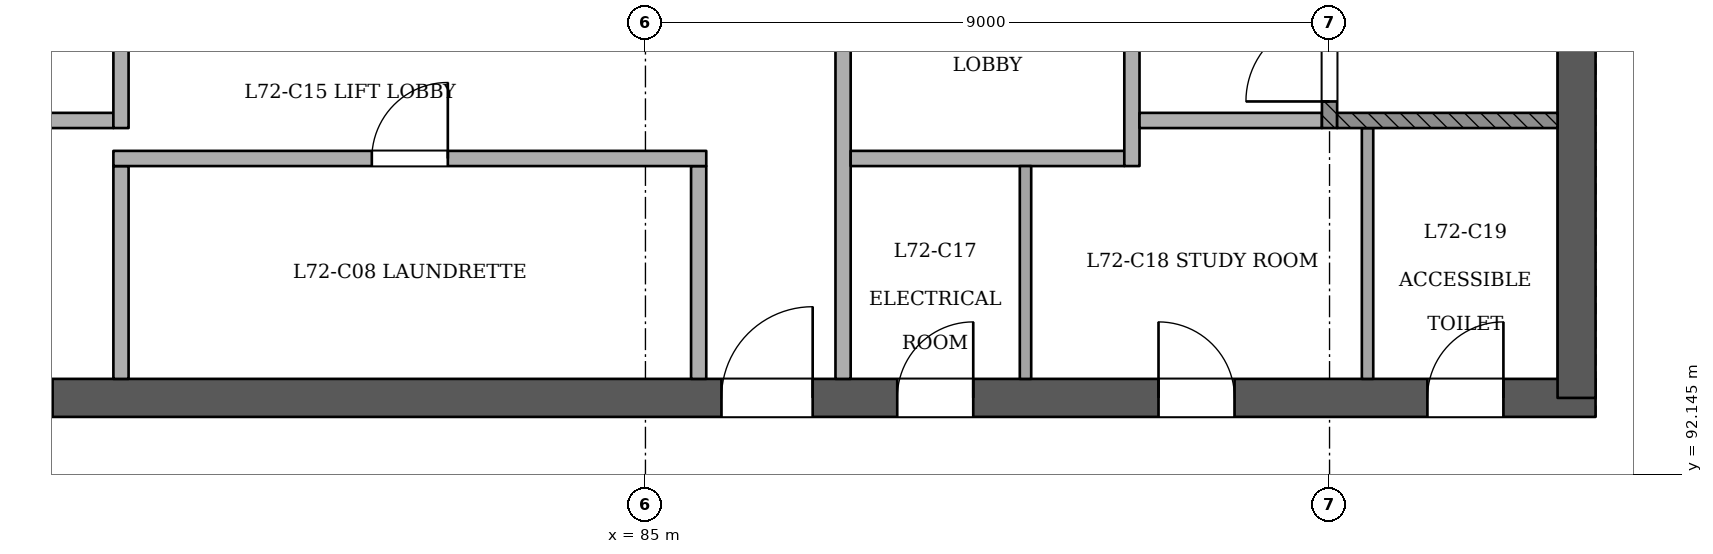
"""IFC4 building model, lengths in metres.
Left out: names, types, materials, properties, quantities, classifications, styles, units other than length and angle.
Written with IfcOpenShell. Run it as: python <this file> out.ifc"""

import sys

from ifc_helpers import new_model, si_unit, direction, frame, frame_2d, origin, place, context, subcontext, project, spatial, rectangle, extrude, element, fill, save


model = new_model("IFC4")
c1 = context("Model", 3, precision=1e-05, world=origin(), true_north=direction((0.0, 1.0)))
c2 = subcontext(c1, "Body", "Model", "MODEL_VIEW")
j1 = project(units=[si_unit("LENGTHUNIT", "METRE"), si_unit("PLANEANGLEUNIT", "RADIAN")], contexts=[c1])
p1 = place(None, origin())
s1 = spatial("IfcSite", under=j1, at=p1, CompositionType="ELEMENT")
p2 = place(p1, origin())
s2 = spatial("IfcBuilding", under=s1, at=p2, CompositionType="ELEMENT")
p3 = place(p2, frame((0.0, 0.0, 278.8)))
s3 = spatial("IfcBuildingStorey", under=s2, at=p3, CompositionType="ELEMENT", Elevation=278.8)
p4 = place(p3, frame((72.75, 93.15, 0.0), z_axis=(0.0, 0.0, 1.0), x_axis=(1.0, 0.0, 0.0)))
e1 = element("IfcWall", 1, at=p4, inside=s3, PredefinedType="SHEAR", context=c2, shape_type="SweptSolid", body=[
    extrude(rectangle(XDim=24.75, YDim=0.5, at=frame_2d((12.375, 0.0))), origin(), (0.0, 0.0, 1.0), 3.6),
])
p5 = place(p4, frame((1.05, 0.0, 0.0)))
e2 = element("IfcOpeningElement", 2, at=p5, cuts=e1, PredefinedType="OPENING", context=c2, shape_type="SweptSolid", body=[
    extrude(rectangle(XDim=1.2, YDim=2.1, at=frame_2d((0.6, 1.05))), frame((0.0, 0.26, 0.0), z_axis=(0.0, -1.0, 0.0), x_axis=(1.0, 0.0, 0.0)), (0.0, 0.0, 1.0), 0.521),
])
p6 = place(p4, frame((3.25, 0.0, 0.0)))
e3 = element("IfcOpeningElement", 3, at=p6, cuts=e1, PredefinedType="OPENING", context=c2, shape_type="SweptSolid", body=[
    extrude(rectangle(XDim=1.2, YDim=2.1, at=frame_2d((0.6, 1.05))), frame((0.0, 0.26, 0.0), z_axis=(0.0, -1.0, 0.0), x_axis=(1.0, 0.0, 0.0)), (0.0, 0.0, 1.0), 0.521),
])
p7 = place(p4, frame((13.25, 0.0, 0.0)))
e4 = element("IfcOpeningElement", 4, at=p7, cuts=e1, PredefinedType="OPENING", context=c2, shape_type="SweptSolid", body=[
    extrude(rectangle(XDim=1.2, YDim=2.1, at=frame_2d((0.6, 1.05))), frame((0.0, 0.26, 0.0), z_axis=(0.0, -1.0, 0.0), x_axis=(1.0, 0.0, 0.0)), (0.0, 0.0, 1.0), 0.521),
])
p8 = place(p4, frame((15.562, 0.0, 0.0)))
e5 = element("IfcOpeningElement", 5, at=p8, cuts=e1, PredefinedType="OPENING", context=c2, shape_type="SweptSolid", body=[
    extrude(rectangle(XDim=1.0, YDim=2.1, at=frame_2d((0.5, 1.05))), frame((0.0, 0.26, 0.0), z_axis=(0.0, -1.0, 0.0), x_axis=(1.0, 0.0, 0.0)), (0.0, 0.0, 1.0), 0.521),
])
p9 = place(p4, frame((19.0, 0.0, 0.0)))
e6 = element("IfcOpeningElement", 6, at=p9, cuts=e1, PredefinedType="OPENING", context=c2, shape_type="SweptSolid", body=[
    extrude(rectangle(XDim=1.0, YDim=2.1, at=frame_2d((0.5, 1.05))), frame((0.0, 0.26, 0.0), z_axis=(0.0, -1.0, 0.0), x_axis=(1.0, 0.0, 0.0)), (0.0, 0.0, 1.0), 0.521),
])
p10 = place(p4, frame((22.538, 0.0, 0.0)))
e7 = element("IfcOpeningElement", 7, at=p10, cuts=e1, PredefinedType="OPENING", context=c2, shape_type="SweptSolid", body=[
    extrude(rectangle(XDim=1.0, YDim=2.1, at=frame_2d((0.5, 1.05))), frame((0.0, 0.26, 0.0), z_axis=(0.0, -1.0, 0.0), x_axis=(1.0, 0.0, 0.0)), (0.0, 0.0, 1.0), 0.521),
])
p11 = place(p3, frame((97.25, 93.15, 0.0), z_axis=(0.0, 0.0, 1.0), x_axis=(0.0, 1.0, 0.0)))
e8 = element("IfcWall", 8, at=p11, inside=s3, PredefinedType="SHEAR", context=c2, shape_type="SweptSolid", body=[
    extrude(rectangle(XDim=10.75, YDim=0.5, at=frame_2d((5.375, 0.0))), origin(), (0.0, 0.0, 1.0), 3.6),
])
for number, where, z_axis, x_axis in (
    (9, (78.1, 93.4, 0.0), (0.0, 0.0, 1.0), (0.0, 1.0, 0.0)),
    (10, (85.7, 93.4, 0.0), (0.0, 0.0, 1.0), (0.0, 1.0, 0.0)),
):
    element("IfcWall", number, at=place(p3, frame(where, z_axis=z_axis, x_axis=x_axis)), inside=s3, PredefinedType="PARTITIONING", context=c2, shape_type="SweptSolid", body=[
        extrude(rectangle(XDim=2.8, YDim=0.2, at=frame_2d((1.4, 0.0))), origin(), (0.0, 0.0, 1.0), 3.2),
    ])
p12 = place(p3, frame((87.6, 93.4, 0.0), z_axis=(0.0, 0.0, 1.0), x_axis=(0.0, 1.0, 0.0)))
e11 = element("IfcWall", 11, at=p12, inside=s3, PredefinedType="PARTITIONING", context=c2, shape_type="SweptSolid", body=[
    extrude(rectangle(XDim=7.0, YDim=0.2, at=frame_2d((3.5, 0.0))), origin(), (0.0, 0.0, 1.0), 3.2),
])
p13 = place(p12, frame((4.45, 0.0, 0.0)))
e12 = element("IfcOpeningElement", 12, at=p13, cuts=e11, PredefinedType="OPENING", context=c2, shape_type="SweptSolid", body=[
    extrude(rectangle(XDim=1.1, YDim=2.1, at=frame_2d((0.55, 1.05))), frame((0.0, 0.11, 0.0), z_axis=(0.0, -1.0, 0.0), x_axis=(1.0, 0.0, 0.0)), (0.0, 0.0, 1.0), 0.221),
])
p14 = place(p3, frame((90.0, 93.4, 0.0), z_axis=(0.0, 0.0, 1.0), x_axis=(0.0, 1.0, 0.0)))
e13 = element("IfcWall", 13, at=p14, inside=s3, PredefinedType="PARTITIONING", context=c2, shape_type="SweptSolid", body=[
    extrude(rectangle(XDim=2.8, YDim=0.15, at=frame_2d((1.4, 0.0))), origin(), (0.0, 0.0, 1.0), 3.2),
])
p15 = place(p3, frame((94.5, 93.4, 0.0), z_axis=(0.0, 0.0, 1.0), x_axis=(0.0, 1.0, 0.0)))
e14 = element("IfcWall", 14, at=p15, inside=s3, PredefinedType="PARTITIONING", context=c2, shape_type="SweptSolid", body=[
    extrude(rectangle(XDim=3.3, YDim=0.15, at=frame_2d((1.65, 0.0))), origin(), (0.0, 0.0, 1.0), 3.2),
])
p16 = place(p3, frame((78.0, 96.3, 0.0), z_axis=(0.0, 0.0, 1.0), x_axis=(1.0, 0.0, 0.0)))
e15 = element("IfcWall", 15, at=p16, inside=s3, PredefinedType="PARTITIONING", context=c2, shape_type="SweptSolid", body=[
    extrude(rectangle(XDim=7.8, YDim=0.2, at=frame_2d((3.9, 0.0))), origin(), (0.0, 0.0, 1.0), 3.2),
])
p17 = place(p16, frame((3.4, 0.0, 0.0)))
e16 = element("IfcOpeningElement", 16, at=p17, cuts=e15, PredefinedType="OPENING", context=c2, shape_type="SweptSolid", body=[
    extrude(rectangle(XDim=1.0, YDim=2.1, at=frame_2d((0.5, 1.05))), frame((0.0, 0.11, 0.0), z_axis=(0.0, -1.0, 0.0), x_axis=(1.0, 0.0, 0.0)), (0.0, 0.0, 1.0), 0.221),
])
p18 = place(p3, frame((87.7, 96.3, 0.0), z_axis=(0.0, 0.0, 1.0), x_axis=(1.0, 0.0, 0.0)))
e17 = element("IfcWall", 17, at=p18, inside=s3, PredefinedType="PARTITIONING", context=c2, shape_type="SweptSolid", body=[
    extrude(rectangle(XDim=3.6, YDim=0.2, at=frame_2d((1.8, 0.0))), origin(), (0.0, 0.0, 1.0), 3.2),
])
p19 = place(p3, frame((91.4, 96.2, 0.0), z_axis=(0.0, 0.0, 1.0), x_axis=(0.0, 1.0, 0.0)))
e18 = element("IfcWall", 18, at=p19, inside=s3, PredefinedType="PARTITIONING", context=c2, shape_type="SweptSolid", body=[
    extrude(rectangle(XDim=4.2, YDim=0.2, at=frame_2d((2.1, 0.0))), origin(), (0.0, 0.0, 1.0), 3.2),
])
p20 = place(p19, frame((2.45, 0.0, 0.0)))
e19 = element("IfcOpeningElement", 19, at=p20, cuts=e18, PredefinedType="OPENING", context=c2, shape_type="SweptSolid", body=[
    extrude(rectangle(XDim=1.1, YDim=2.1, at=frame_2d((0.55, 1.05))), frame((0.0, 0.11, 0.0), z_axis=(0.0, -1.0, 0.0), x_axis=(1.0, 0.0, 0.0)), (0.0, 0.0, 1.0), 0.221),
])
p21 = place(p3, frame((76.1, 96.8, 0.0), z_axis=(0.0, 0.0, 1.0), x_axis=(1.0, 0.0, 0.0)))
e20 = element("IfcWall", 20, at=p21, inside=s3, PredefinedType="PARTITIONING", context=c2, shape_type="SweptSolid", body=[
    extrude(rectangle(XDim=1.9, YDim=0.2, at=frame_2d((0.95, 0.0))), origin(), (0.0, 0.0, 1.0), 3.2),
])
p22 = place(p3, frame((78.1, 96.7, 0.0), z_axis=(0.0, 0.0, 1.0), x_axis=(0.0, 1.0, 0.0)))
e21 = element("IfcWall", 21, at=p22, inside=s3, PredefinedType="PARTITIONING", context=c2, shape_type="SweptSolid", body=[
    extrude(rectangle(XDim=3.7, YDim=0.2, at=frame_2d((1.85, 0.0))), origin(), (0.0, 0.0, 1.0), 3.2),
])
p23 = place(p22, frame((1.95, 0.0, 0.0)))
e22 = element("IfcOpeningElement", 22, at=p23, cuts=e21, PredefinedType="OPENING", context=c2, shape_type="SweptSolid", body=[
    extrude(rectangle(XDim=1.1, YDim=2.1, at=frame_2d((0.55, 1.05))), frame((0.0, 0.11, 0.0), z_axis=(0.0, -1.0, 0.0), x_axis=(1.0, 0.0, 0.0)), (0.0, 0.0, 1.0), 0.221),
])
p24 = place(p3, frame((91.5, 96.8, 0.0), z_axis=(0.0, 0.0, 1.0), x_axis=(1.0, 0.0, 0.0)))
e23 = element("IfcWall", 23, at=p24, inside=s3, PredefinedType="PARTITIONING", context=c2, shape_type="SweptSolid", body=[
    extrude(rectangle(XDim=2.4, YDim=0.2, at=frame_2d((1.2, 0.0))), origin(), (0.0, 0.0, 1.0), 3.2),
])
p25 = place(p3, frame((94.0, 96.7, 0.0), z_axis=(0.0, 0.0, 1.0), x_axis=(0.0, 1.0, 0.0)))
e24 = element("IfcWall", 24, at=p25, inside=s3, PredefinedType="SOLIDWALL", context=c2, shape_type="SweptSolid", body=[
    extrude(rectangle(XDim=3.7, YDim=0.2, at=frame_2d((1.85, 0.0))), origin(), (0.0, 0.0, 1.0), 3.2),
])
p26 = place(p25, frame((0.35, 0.0, 0.0)))
e25 = element("IfcOpeningElement", 25, at=p26, cuts=e24, PredefinedType="OPENING", context=c2, shape_type="SweptSolid", body=[
    extrude(rectangle(XDim=1.1, YDim=2.1, at=frame_2d((0.55, 1.05))), frame((0.0, 0.11, 0.0), z_axis=(0.0, -1.0, 0.0), x_axis=(1.0, 0.0, 0.0)), (0.0, 0.0, 1.0), 0.221),
])
p27 = place(p3, frame((94.1, 96.8, 0.0), z_axis=(0.0, 0.0, 1.0), x_axis=(1.0, 0.0, 0.0)))
e26 = element("IfcWall", 26, at=p27, inside=s3, PredefinedType="SOLIDWALL", context=c2, shape_type="SweptSolid", body=[
    extrude(rectangle(XDim=2.9, YDim=0.2, at=frame_2d((1.45, 0.0))), origin(), (0.0, 0.0, 1.0), 3.2),
])
p28 = place(p26, origin())
e27 = element("IfcDoor", 27, at=p28, inside=s3, OperationType="SINGLE_SWING_LEFT", PredefinedType="NOTDEFINED", context=c2, shape_type="SweptSolid", body=[
    extrude(rectangle(XDim=1.1, YDim=2.1, at=frame_2d((0.55, 1.05))), frame((0.0, 0.025, 0.0), z_axis=(0.0, -1.0, 0.0), x_axis=(1.0, 0.0, 0.0)), (0.0, 0.0, 1.0), 0.05),
])
fill(e25, e27)
p29 = place(p6, origin())
e28 = element("IfcDoor", 28, at=p29, inside=s3, OperationType="SINGLE_SWING_LEFT", PredefinedType="NOTDEFINED", context=c2, shape_type="SweptSolid", body=[
    extrude(rectangle(XDim=1.2, YDim=2.1, at=frame_2d((0.6, 1.05))), frame((0.0, 0.025, 0.0), z_axis=(0.0, -1.0, 0.0), x_axis=(1.0, 0.0, 0.0)), (0.0, 0.0, 1.0), 0.05),
])
fill(e3, e28)
p30 = place(p7, origin())
e29 = element("IfcDoor", 29, at=p30, inside=s3, OperationType="SINGLE_SWING_RIGHT", PredefinedType="NOTDEFINED", context=c2, shape_type="SweptSolid", body=[
    extrude(rectangle(XDim=1.2, YDim=2.1, at=frame_2d((0.6, 1.05))), frame((0.0, 0.025, 0.0), z_axis=(0.0, -1.0, 0.0), x_axis=(1.0, 0.0, 0.0)), (0.0, 0.0, 1.0), 0.05),
])
fill(e4, e29)
p31 = place(p8, origin())
e30 = element("IfcDoor", 30, at=p31, inside=s3, OperationType="SINGLE_SWING_RIGHT", PredefinedType="NOTDEFINED", context=c2, shape_type="SweptSolid", body=[
    extrude(rectangle(XDim=1.0, YDim=2.1, at=frame_2d((0.5, 1.05))), frame((0.0, 0.025, 0.0), z_axis=(0.0, -1.0, 0.0), x_axis=(1.0, 0.0, 0.0)), (0.0, 0.0, 1.0), 0.05),
])
fill(e5, e30)
p32 = place(p9, origin())
e31 = element("IfcDoor", 31, at=p32, inside=s3, OperationType="SINGLE_SWING_LEFT", PredefinedType="NOTDEFINED", context=c2, shape_type="SweptSolid", body=[
    extrude(rectangle(XDim=1.0, YDim=2.1, at=frame_2d((0.5, 1.05))), frame((0.0, 0.025, 0.0), z_axis=(0.0, -1.0, 0.0), x_axis=(1.0, 0.0, 0.0)), (0.0, 0.0, 1.0), 0.05),
])
fill(e6, e31)
p33 = place(p10, origin())
e32 = element("IfcDoor", 32, at=p33, inside=s3, OperationType="SINGLE_SWING_RIGHT", PredefinedType="NOTDEFINED", context=c2, shape_type="SweptSolid", body=[
    extrude(rectangle(XDim=1.0, YDim=2.1, at=frame_2d((0.5, 1.05))), frame((0.0, 0.025, 0.0), z_axis=(0.0, -1.0, 0.0), x_axis=(1.0, 0.0, 0.0)), (0.0, 0.0, 1.0), 0.05),
])
fill(e7, e32)
p34 = place(p17, origin())
e33 = element("IfcDoor", 33, at=p34, inside=s3, OperationType="SINGLE_SWING_RIGHT", PredefinedType="NOTDEFINED", context=c2, shape_type="SweptSolid", body=[
    extrude(rectangle(XDim=1.0, YDim=2.1, at=frame_2d((0.5, 1.05))), frame((0.0, 0.025, 0.0), z_axis=(0.0, -1.0, 0.0), x_axis=(1.0, 0.0, 0.0)), (0.0, 0.0, 1.0), 0.05),
])
fill(e16, e33)
save(model, sys.argv[1])
